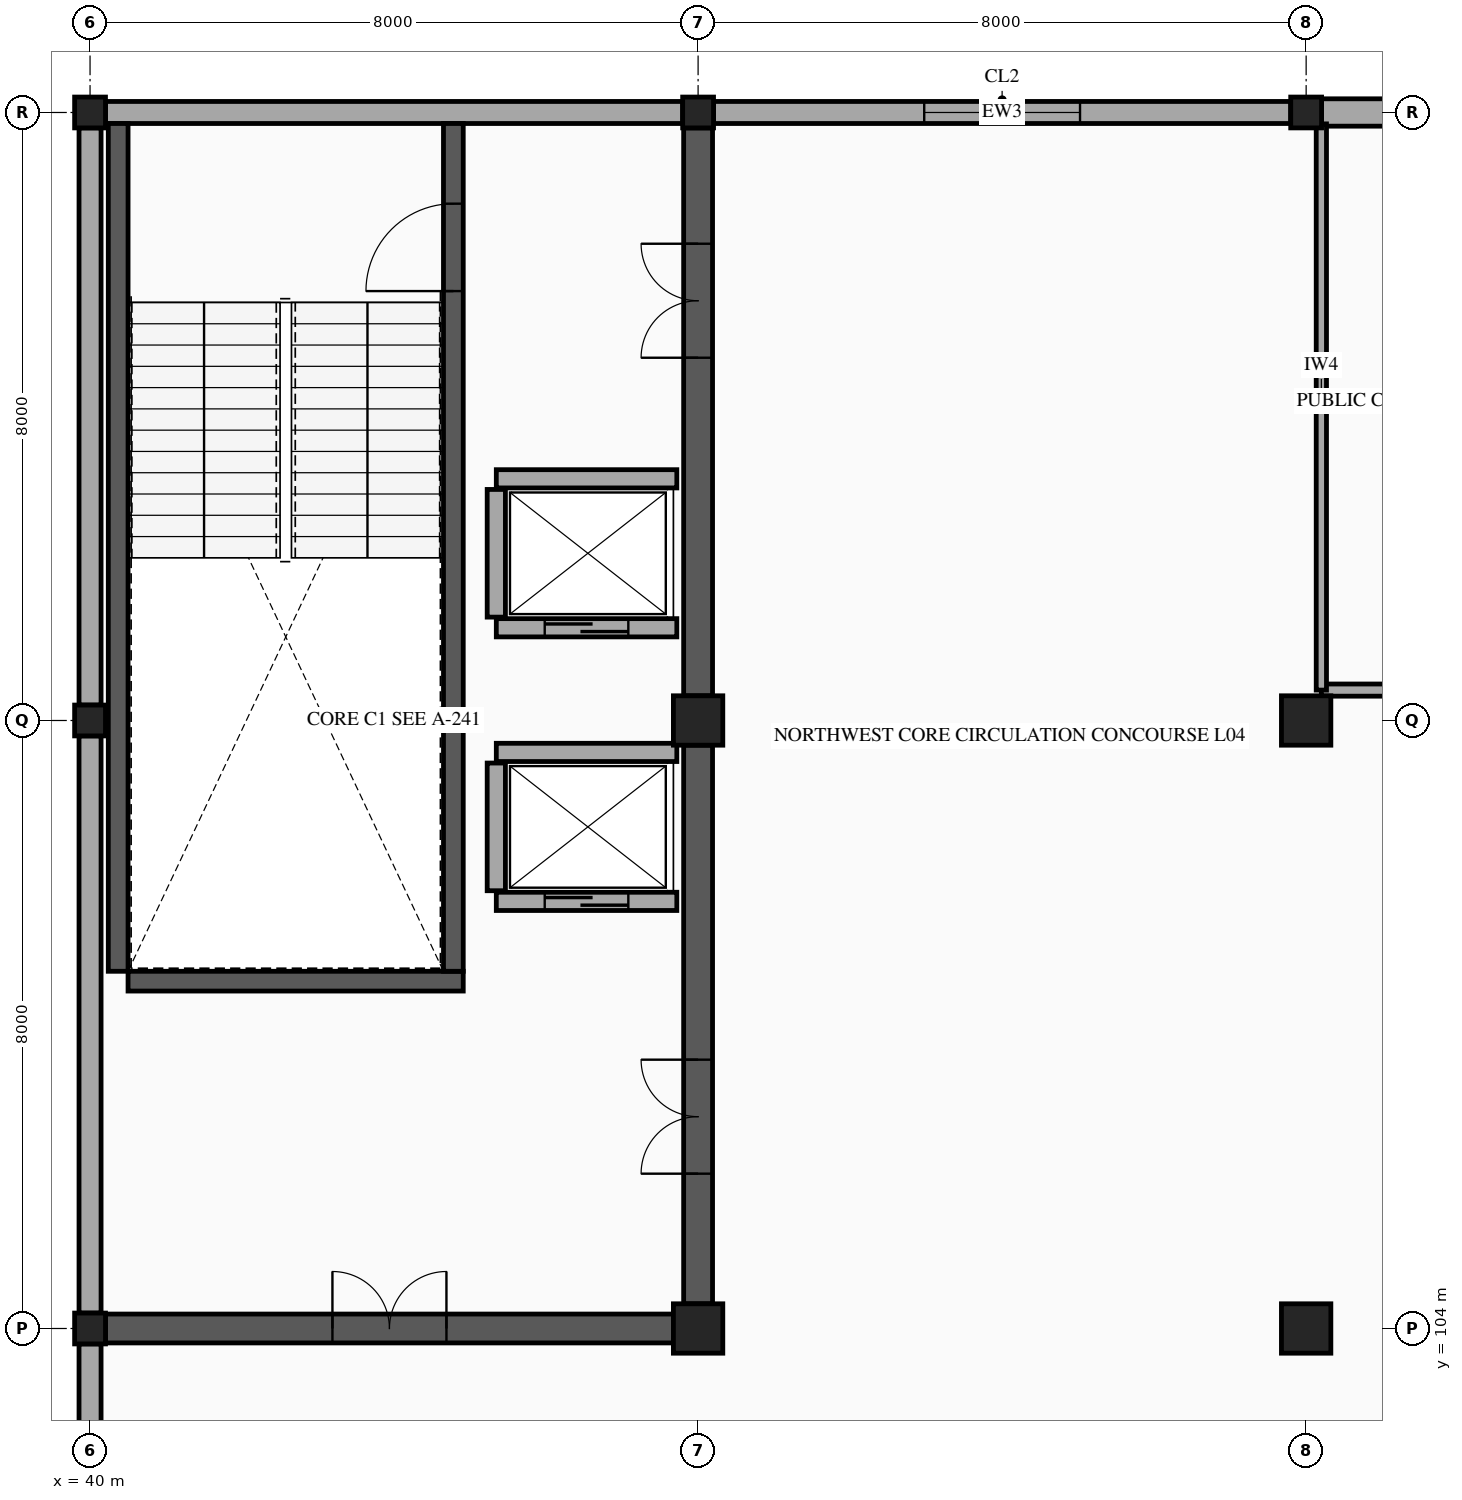
"""IFC4 building model, lengths in metres.
Left out: names, types, materials, properties, quantities, classifications, styles, units other than length and angle.
Written with IfcOpenShell. Run it as: python <this file> out.ifc"""

import sys

from ifc_helpers import new_model, si_unit, direction, frame, frame_2d, origin, origin_2d, place, context, subcontext, project, spatial, rectangle, hollow_rectangle, extrude, element, fill, save


model = new_model("IFC4")
c1 = context("Model", 3, precision=1e-05, world=origin(), true_north=direction((0.0, 1.0)))
c2 = subcontext(c1, "Body", "Model", "MODEL_VIEW")
j1 = project(units=[si_unit("LENGTHUNIT", "METRE"), si_unit("PLANEANGLEUNIT", "RADIAN")], contexts=[c1])
p1 = place(None, origin())
s1 = spatial("IfcSite", under=j1, at=p1, CompositionType="ELEMENT")
p2 = place(p1, origin())
s2 = spatial("IfcBuilding", under=s1, at=p2, CompositionType="ELEMENT")
p3 = place(p2, frame((0.0, 0.0, 19.4)))
s3 = spatial("IfcBuildingStorey", under=s2, at=p3, CompositionType="ELEMENT", Elevation=19.4)
for number, where, z_axis, x_axis in (
    (1, (40.0, 104.0, 0.0), (0.0, 0.0, 1.0), (1.0, 0.0, 0.0)),
    (2, (40.0, 112.0, 0.0), (0.0, 0.0, 1.0), (1.0, 0.0, 0.0)),
    (3, (40.0, 120.0, 0.0), (0.0, 0.0, 1.0), (1.0, 0.0, 0.0)),
):
    element("IfcColumn", number, at=place(p3, frame(where, z_axis=z_axis, x_axis=x_axis)), inside=s3, PredefinedType="COLUMN", context=c2, shape_type="SweptSolid", body=[
        extrude(hollow_rectangle(XDim=0.406, YDim=0.406, WallThickness=0.015, InnerFilletRadius=0.015, OuterFilletRadius=0.029, at=origin_2d()), origin(), (0.0, 0.0, 1.0), 4.5),
    ])
for number, where, z_axis, x_axis in (
    (4, (48.0, 104.0, 0.0), (0.0, 0.0, 1.0), (1.0, 0.0, 0.0)),
    (5, (48.0, 112.0, 0.0), (0.0, 0.0, 1.0), (1.0, 0.0, 0.0)),
):
    element("IfcColumn", number, at=place(p3, frame(where, z_axis=z_axis, x_axis=x_axis)), inside=s3, PredefinedType="COLUMN", context=c2, shape_type="SweptSolid", body=[
        extrude(rectangle(XDim=0.65, YDim=0.65, at=origin_2d()), origin(), (0.0, 0.0, 1.0), 4.5),
    ])
p4 = place(p3, frame((48.0, 120.0, 0.0), z_axis=(0.0, 0.0, 1.0), x_axis=(1.0, 0.0, 0.0)))
e6 = element("IfcColumn", 6, at=p4, inside=s3, PredefinedType="COLUMN", context=c2, shape_type="SweptSolid", body=[
    extrude(hollow_rectangle(XDim=0.406, YDim=0.406, WallThickness=0.015, InnerFilletRadius=0.015, OuterFilletRadius=0.029, at=origin_2d()), origin(), (0.0, 0.0, 1.0), 4.5),
])
for number, where, z_axis, x_axis in (
    (7, (56.0, 104.0, 0.0), (0.0, 0.0, 1.0), (1.0, 0.0, 0.0)),
    (8, (56.0, 112.0, 0.0), (0.0, 0.0, 1.0), (1.0, 0.0, 0.0)),
):
    element("IfcColumn", number, at=place(p3, frame(where, z_axis=z_axis, x_axis=x_axis)), inside=s3, PredefinedType="COLUMN", context=c2, shape_type="SweptSolid", body=[
        extrude(rectangle(XDim=0.65, YDim=0.65, at=origin_2d()), origin(), (0.0, 0.0, 1.0), 4.5),
    ])
p5 = place(p3, frame((56.0, 120.0, 0.0), z_axis=(0.0, 0.0, 1.0), x_axis=(1.0, 0.0, 0.0)))
e9 = element("IfcColumn", 9, at=p5, inside=s3, PredefinedType="COLUMN", context=c2, shape_type="SweptSolid", body=[
    extrude(hollow_rectangle(XDim=0.406, YDim=0.406, WallThickness=0.015, InnerFilletRadius=0.015, OuterFilletRadius=0.029, at=origin_2d()), origin(), (0.0, 0.0, 1.0), 4.5),
])
p6 = place(p3, frame((40.0, 96.203, 0.0), z_axis=(0.0, 0.0, 1.0), x_axis=(0.0, 1.0, 0.0)))
e10 = element("IfcWall", 10, at=p6, inside=s3, PredefinedType="STANDARD", context=c2, shape_type="SweptSolid", body=[
    extrude(rectangle(XDim=7.594, YDim=0.29, at=frame_2d((3.797, 0.0))), origin(), (0.0, 0.0, 1.0), 3.48),
])
p7 = place(p6, frame((2.772, 0.0, 0.8)))
e11 = element("IfcOpeningElement", 11, at=p7, cuts=e10, PredefinedType="OPENING", context=c2, shape_type="SweptSolid", body=[
    extrude(rectangle(XDim=2.05, YDim=1.95, at=frame_2d((1.025, 0.975))), frame((0.0, 0.155, 0.0), z_axis=(0.0, -1.0, 0.0), x_axis=(1.0, 0.0, 0.0)), (0.0, 0.0, 1.0), 0.31),
])
for number, where, z_axis, x_axis in (
    (12, (40.0, 104.203, 0.0), (0.0, 0.0, 1.0), (0.0, 1.0, 0.0)),
    (13, (40.0, 112.203, 0.0), (0.0, 0.0, 1.0), (0.0, 1.0, 0.0)),
    (14, (40.203, 120.0, 0.0), (0.0, 0.0, 1.0), (1.0, 0.0, 0.0)),
):
    element("IfcWall", number, at=place(p3, frame(where, z_axis=z_axis, x_axis=x_axis)), inside=s3, PredefinedType="STANDARD", context=c2, shape_type="SweptSolid", body=[
        extrude(rectangle(XDim=7.594, YDim=0.29, at=frame_2d((3.797, 0.0))), origin(), (0.0, 0.0, 1.0), 3.48),
    ])
p8 = place(p3, frame((48.203, 120.0, 0.0), z_axis=(0.0, 0.0, 1.0), x_axis=(1.0, 0.0, 0.0)))
e15 = element("IfcWall", 15, at=p8, inside=s3, PredefinedType="STANDARD", context=c2, shape_type="SweptSolid", body=[
    extrude(rectangle(XDim=7.594, YDim=0.29, at=frame_2d((3.797, 0.0))), origin(), (0.0, 0.0, 1.0), 3.48),
])
p9 = place(p8, frame((2.772, 0.0, 0.8)))
e16 = element("IfcOpeningElement", 16, at=p9, cuts=e15, PredefinedType="OPENING", context=c2, shape_type="SweptSolid", body=[
    extrude(rectangle(XDim=2.05, YDim=1.95, at=frame_2d((1.025, 0.975))), frame((0.0, 0.155, 0.0), z_axis=(0.0, -1.0, 0.0), x_axis=(1.0, 0.0, 0.0)), (0.0, 0.0, 1.0), 0.31),
])
p10 = place(p3, frame((56.203, 120.0, 0.0), z_axis=(0.0, 0.0, 1.0), x_axis=(1.0, 0.0, 0.0)))
e17 = element("IfcWall", 17, at=p10, inside=s3, PredefinedType="SOLIDWALL", context=c2, shape_type="SweptSolid", body=[
    extrude(rectangle(XDim=7.594, YDim=0.36, at=frame_2d((3.797, 0.0))), origin(), (0.0, 0.0, 1.0), 3.48),
])
p11 = place(p3, frame((40.5, 108.57, 0.0), z_axis=(0.0, 0.0, 1.0), x_axis=(1.0, 0.0, 0.0)))
e18 = element("IfcWall", 18, at=p11, inside=s3, PredefinedType="SHEAR", context=c2, shape_type="SweptSolid", body=[
    extrude(rectangle(XDim=4.41, YDim=0.26, at=frame_2d((2.205, 0.0))), origin(), (0.0, 0.0, 1.0), 4.28),
])
p12 = place(p3, frame((40.37, 108.7, 0.0), z_axis=(0.0, 0.0, 1.0), x_axis=(0.0, 1.0, 0.0)))
e19 = element("IfcWall", 19, at=p12, inside=s3, PredefinedType="SHEAR", context=c2, shape_type="SweptSolid", body=[
    extrude(rectangle(XDim=11.155, YDim=0.26, at=frame_2d((5.578, 0.0))), origin(), (0.0, 0.0, 1.0), 4.28),
])
p13 = place(p3, frame((44.78, 108.7, 0.0), z_axis=(0.0, 0.0, 1.0), x_axis=(0.0, 1.0, 0.0)))
e20 = element("IfcWall", 20, at=p13, inside=s3, PredefinedType="SHEAR", context=c2, shape_type="SweptSolid", body=[
    extrude(rectangle(XDim=11.155, YDim=0.26, at=frame_2d((5.578, 0.0))), origin(), (0.0, 0.0, 1.0), 4.28),
])
p14 = place(p13, frame((8.95, 0.0, 0.0)))
e21 = element("IfcOpeningElement", 21, at=p14, cuts=e20, PredefinedType="OPENING", context=c2, shape_type="SweptSolid", body=[
    extrude(rectangle(XDim=1.15, YDim=2.15, at=frame_2d((0.575, 1.075))), frame((0.0, 0.14, 0.0), z_axis=(0.0, -1.0, 0.0), x_axis=(1.0, 0.0, 0.0)), (0.0, 0.0, 1.0), 0.28),
])
p15 = place(p3, frame((40.203, 104.0, 0.0), z_axis=(0.0, 0.0, 1.0), x_axis=(1.0, 0.0, 0.0)))
e22 = element("IfcWall", 22, at=p15, inside=s3, PredefinedType="SHEAR", context=c2, shape_type="SweptSolid", body=[
    extrude(rectangle(XDim=7.472, YDim=0.38, at=frame_2d((3.736, 0.0))), origin(), (0.0, 0.0, 1.0), 4.28),
])
p16 = place(p15, frame((2.986, 0.0, 0.0)))
e23 = element("IfcOpeningElement", 23, at=p16, cuts=e22, PredefinedType="OPENING", context=c2, shape_type="SweptSolid", body=[
    extrude(rectangle(XDim=1.5, YDim=2.15, at=frame_2d((0.75, 1.075))), frame((0.0, 0.2, 0.0), z_axis=(0.0, -1.0, 0.0), x_axis=(1.0, 0.0, 0.0)), (0.0, 0.0, 1.0), 0.4),
])
p17 = place(p3, frame((48.0, 104.325, 0.0), z_axis=(0.0, 0.0, 1.0), x_axis=(0.0, 1.0, 0.0)))
e24 = element("IfcWall", 24, at=p17, inside=s3, PredefinedType="SHEAR", context=c2, shape_type="SweptSolid", body=[
    extrude(rectangle(XDim=7.35, YDim=0.38, at=frame_2d((3.675, 0.0))), origin(), (0.0, 0.0, 1.0), 4.28),
])
p18 = place(p17, frame((1.712, 0.0, 0.0)))
e25 = element("IfcOpeningElement", 25, at=p18, cuts=e24, PredefinedType="OPENING", context=c2, shape_type="SweptSolid", body=[
    extrude(rectangle(XDim=1.5, YDim=2.15, at=frame_2d((0.75, 1.075))), frame((0.0, 0.2, 0.0), z_axis=(0.0, -1.0, 0.0), x_axis=(1.0, 0.0, 0.0)), (0.0, 0.0, 1.0), 0.4),
])
p19 = place(p3, frame((48.0, 112.325, 0.0), z_axis=(0.0, 0.0, 1.0), x_axis=(0.0, 1.0, 0.0)))
e26 = element("IfcWall", 26, at=p19, inside=s3, PredefinedType="SHEAR", context=c2, shape_type="SweptSolid", body=[
    extrude(rectangle(XDim=7.472, YDim=0.38, at=frame_2d((3.736, 0.0))), origin(), (0.0, 0.0, 1.0), 4.28),
])
p20 = place(p19, frame((4.448, 0.0, 0.0)))
e27 = element("IfcOpeningElement", 27, at=p20, cuts=e26, PredefinedType="OPENING", context=c2, shape_type="SweptSolid", body=[
    extrude(rectangle(XDim=1.5, YDim=2.15, at=frame_2d((0.75, 1.075))), frame((0.0, 0.2, 0.0), z_axis=(0.0, -1.0, 0.0), x_axis=(1.0, 0.0, 0.0)), (0.0, 0.0, 1.0), 0.4),
])
p21 = place(p3, frame((45.345, 113.22, 0.0), z_axis=(0.0, 0.0, 1.0), x_axis=(1.0, 0.0, 0.0)))
e28 = element("IfcWall", 28, at=p21, inside=s3, PredefinedType="PARTITIONING", context=c2, shape_type="SweptSolid", body=[
    extrude(rectangle(XDim=2.375, YDim=0.24, at=frame_2d((1.188, 0.0))), origin(), (0.0, 0.0, 1.0), 4.28),
])
p22 = place(p21, frame((0.637, 0.0, 0.0)))
e29 = element("IfcOpeningElement", 29, at=p22, cuts=e28, PredefinedType="OPENING", context=c2, shape_type="SweptSolid", body=[
    extrude(rectangle(XDim=1.1, YDim=2.15, at=frame_2d((0.55, 1.075))), frame((0.0, 0.13, 0.0), z_axis=(0.0, -1.0, 0.0), x_axis=(1.0, 0.0, 0.0)), (0.0, 0.0, 1.0), 0.26),
])
p23 = place(p3, frame((45.345, 115.18, 0.0), z_axis=(0.0, 0.0, 1.0), x_axis=(1.0, 0.0, 0.0)))
e30 = element("IfcWall", 30, at=p23, inside=s3, PredefinedType="PARTITIONING", context=c2, shape_type="SweptSolid", body=[
    extrude(rectangle(XDim=2.375, YDim=0.24, at=frame_2d((1.188, 0.0))), origin(), (0.0, 0.0, 1.0), 4.28),
])
p24 = place(p3, frame((45.345, 113.36, 0.0), z_axis=(0.0, 0.0, 1.0), x_axis=(0.0, 1.0, 0.0)))
e31 = element("IfcWall", 31, at=p24, inside=s3, PredefinedType="PARTITIONING", context=c2, shape_type="SweptSolid", body=[
    extrude(rectangle(XDim=1.68, YDim=0.24, at=frame_2d((0.84, 0.0))), origin(), (0.0, 0.0, 1.0), 4.28),
])
p25 = place(p3, frame((45.345, 109.62, 0.0), z_axis=(0.0, 0.0, 1.0), x_axis=(1.0, 0.0, 0.0)))
e32 = element("IfcWall", 32, at=p25, inside=s3, PredefinedType="PARTITIONING", context=c2, shape_type="SweptSolid", body=[
    extrude(rectangle(XDim=2.375, YDim=0.24, at=frame_2d((1.188, 0.0))), origin(), (0.0, 0.0, 1.0), 4.28),
])
p26 = place(p25, frame((0.637, 0.0, 0.0)))
e33 = element("IfcOpeningElement", 33, at=p26, cuts=e32, PredefinedType="OPENING", context=c2, shape_type="SweptSolid", body=[
    extrude(rectangle(XDim=1.1, YDim=2.15, at=frame_2d((0.55, 1.075))), frame((0.0, 0.13, 0.0), z_axis=(0.0, -1.0, 0.0), x_axis=(1.0, 0.0, 0.0)), (0.0, 0.0, 1.0), 0.26),
])
p27 = place(p3, frame((45.345, 111.58, 0.0), z_axis=(0.0, 0.0, 1.0), x_axis=(1.0, 0.0, 0.0)))
e34 = element("IfcWall", 34, at=p27, inside=s3, PredefinedType="PARTITIONING", context=c2, shape_type="SweptSolid", body=[
    extrude(rectangle(XDim=2.375, YDim=0.24, at=frame_2d((1.188, 0.0))), origin(), (0.0, 0.0, 1.0), 4.28),
])
p28 = place(p3, frame((45.345, 109.76, 0.0), z_axis=(0.0, 0.0, 1.0), x_axis=(0.0, 1.0, 0.0)))
e35 = element("IfcWall", 35, at=p28, inside=s3, PredefinedType="PARTITIONING", context=c2, shape_type="SweptSolid", body=[
    extrude(rectangle(XDim=1.68, YDim=0.24, at=frame_2d((0.84, 0.0))), origin(), (0.0, 0.0, 1.0), 4.28),
])
p29 = place(p3, frame((56.2, 112.4, 0.0), z_axis=(0.0, 0.0, 1.0), x_axis=(1.0, 0.0, 0.0)))
e36 = element("IfcWall", 36, at=p29, inside=s3, PredefinedType="PARTITIONING", context=c2, shape_type="SweptSolid", body=[
    extrude(rectangle(XDim=4.7, YDim=0.16, at=frame_2d((2.35, 0.0))), origin(), (0.0, 0.0, 1.0), 3.48),
])
p30 = place(p29, frame((3.193, 0.0, 0.0)))
e37 = element("IfcOpeningElement", 37, at=p30, cuts=e36, PredefinedType="OPENING", context=c2, shape_type="SweptSolid", body=[
    extrude(rectangle(XDim=0.92, YDim=2.1, at=frame_2d((0.46, 1.05))), frame((0.0, 0.09, 0.0), z_axis=(0.0, -1.0, 0.0), x_axis=(1.0, 0.0, 0.0)), (0.0, 0.0, 1.0), 0.18),
])
p31 = place(p3, frame((56.2, 112.4, 0.0), z_axis=(0.0, 0.0, 1.0), x_axis=(0.0, 1.0, 0.0)))
e38 = element("IfcWall", 38, at=p31, inside=s3, PredefinedType="PARTITIONING", context=c2, shape_type="SweptSolid", body=[
    extrude(rectangle(XDim=7.45, YDim=0.135, at=frame_2d((3.725, 0.0))), origin(), (0.0, 0.0, 1.0), 3.48),
])
p32 = place(p9, origin())
e39 = element("IfcWindow", 39, at=p32, inside=s3, PartitioningType="DOUBLE_PANEL_VERTICAL", PredefinedType="WINDOW", context=c2, shape_type="SweptSolid", body=[
    extrude(rectangle(XDim=2.05, YDim=1.95, at=frame_2d((1.025, 0.975))), frame((0.0, 0.03, 0.0), z_axis=(0.0, -1.0, 0.0), x_axis=(1.0, 0.0, 0.0)), (0.0, 0.0, 1.0), 0.06),
])
fill(e16, e39)
p33 = place(p14, origin())
e40 = element("IfcDoor", 40, at=p33, inside=s3, OperationType="SINGLE_SWING_LEFT", PredefinedType="DOOR", context=c2, shape_type="SweptSolid", body=[
    extrude(rectangle(XDim=1.15, YDim=2.15, at=frame_2d((0.575, 1.075))), frame((0.0, 0.025, 0.0), z_axis=(0.0, -1.0, 0.0), x_axis=(1.0, 0.0, 0.0)), (0.0, 0.0, 1.0), 0.05),
])
fill(e21, e40)
p34 = place(p16, origin())
e41 = element("IfcDoor", 41, at=p34, inside=s3, OperationType="DOUBLE_DOOR_SINGLE_SWING", PredefinedType="DOOR", context=c2, shape_type="SweptSolid", body=[
    extrude(rectangle(XDim=1.5, YDim=2.15, at=frame_2d((0.75, 1.075))), frame((0.0, 0.025, 0.0), z_axis=(0.0, -1.0, 0.0), x_axis=(1.0, 0.0, 0.0)), (0.0, 0.0, 1.0), 0.05),
])
fill(e23, e41)
p35 = place(p18, origin())
e42 = element("IfcDoor", 42, at=p35, inside=s3, OperationType="DOUBLE_DOOR_SINGLE_SWING", PredefinedType="DOOR", context=c2, shape_type="SweptSolid", body=[
    extrude(rectangle(XDim=1.5, YDim=2.15, at=frame_2d((0.75, 1.075))), frame((0.0, 0.025, 0.0), z_axis=(0.0, -1.0, 0.0), x_axis=(1.0, 0.0, 0.0)), (0.0, 0.0, 1.0), 0.05),
])
fill(e25, e42)
p36 = place(p20, origin())
e43 = element("IfcDoor", 43, at=p36, inside=s3, OperationType="DOUBLE_DOOR_SINGLE_SWING", PredefinedType="DOOR", context=c2, shape_type="SweptSolid", body=[
    extrude(rectangle(XDim=1.5, YDim=2.15, at=frame_2d((0.75, 1.075))), frame((0.0, 0.025, 0.0), z_axis=(0.0, -1.0, 0.0), x_axis=(1.0, 0.0, 0.0)), (0.0, 0.0, 1.0), 0.05),
])
fill(e27, e43)
p37 = place(p22, origin())
e44 = element("IfcDoor", 44, at=p37, inside=s3, OperationType="SLIDING_TO_LEFT", PredefinedType="DOOR", context=c2, shape_type="SweptSolid", body=[
    extrude(rectangle(XDim=1.1, YDim=2.15, at=frame_2d((0.55, 1.075))), frame((0.0, 0.025, 0.0), z_axis=(0.0, -1.0, 0.0), x_axis=(1.0, 0.0, 0.0)), (0.0, 0.0, 1.0), 0.05),
])
fill(e29, e44)
p38 = place(p26, origin())
e45 = element("IfcDoor", 45, at=p38, inside=s3, OperationType="SLIDING_TO_LEFT", PredefinedType="DOOR", context=c2, shape_type="SweptSolid", body=[
    extrude(rectangle(XDim=1.1, YDim=2.15, at=frame_2d((0.55, 1.075))), frame((0.0, 0.025, 0.0), z_axis=(0.0, -1.0, 0.0), x_axis=(1.0, 0.0, 0.0)), (0.0, 0.0, 1.0), 0.05),
])
fill(e33, e45)
save(model, sys.argv[1])
